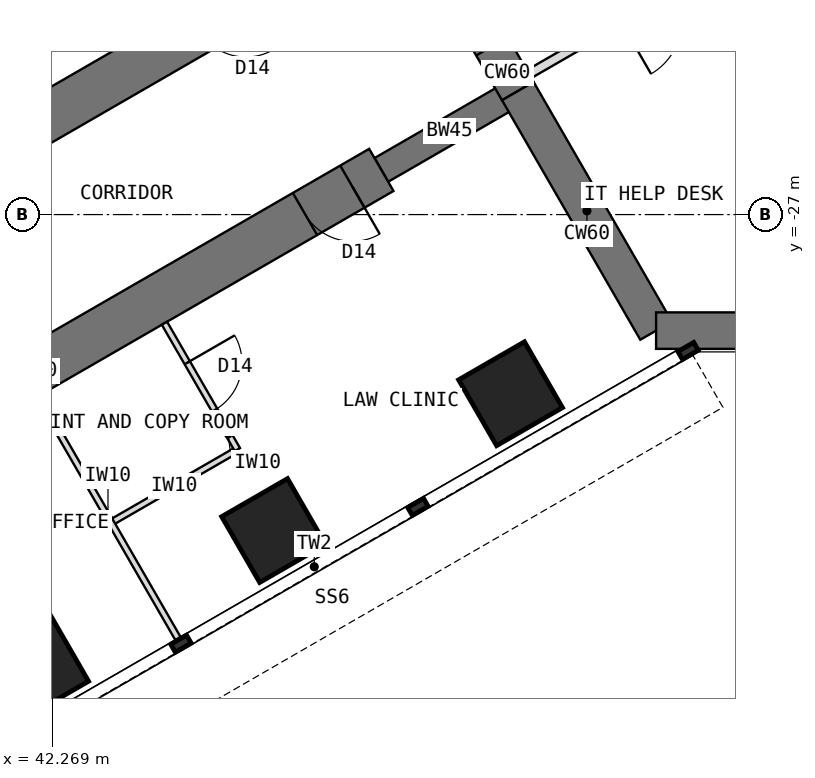
"""IFC4 building model, lengths in metres.
Left out: names, types, materials, properties, quantities, classifications, styles, units other than length and angle.
Written with IfcOpenShell. Run it as: python <this file> out.ifc"""

import sys

from ifc_helpers import new_model, si_unit, direction, frame, frame_2d, origin, origin_2d, place, context, subcontext, project, spatial, rectangle, extrude, element, fill, save


model = new_model("IFC4")
c1 = context("Model", 3, precision=1e-05, world=origin(), true_north=direction((0.0, 1.0)))
c2 = subcontext(c1, "Body", "Model", "MODEL_VIEW")
j1 = project(units=[si_unit("LENGTHUNIT", "METRE"), si_unit("PLANEANGLEUNIT", "RADIAN")], contexts=[c1])
p1 = place(None, origin())
s1 = spatial("IfcSite", under=j1, at=p1, CompositionType="ELEMENT")
p2 = place(p1, origin())
s2 = spatial("IfcBuilding", under=s1, at=p2, CompositionType="ELEMENT")
p3 = place(p2, frame((0.0, 0.0, 145.5)))
s3 = spatial("IfcBuildingStorey", under=s2, at=p3, CompositionType="ELEMENT", Elevation=145.5)
p4 = place(p3, frame((48.178, -21.939, 0.0), z_axis=(0.0, 0.0, 1.0), x_axis=(0.500010275428, -0.866019471182, 0.0)))
e1 = element("IfcWall", 1, at=p4, inside=s3, PredefinedType="SHEAR", context=c2, shape_type="SweptSolid", body=[
    extrude(rectangle(XDim=3.5, YDim=0.6, at=frame_2d((1.75, 0.0))), origin(), (0.0, 0.0, 1.0), 4.0),
])
p5 = place(p4, frame((0.85, 0.0, 0.0)))
e2 = element("IfcOpeningElement", 2, at=p5, cuts=e1, PredefinedType="OPENING", context=c2, shape_type="SweptSolid", body=[
    extrude(rectangle(XDim=1.8, YDim=2.1, at=frame_2d((0.9, 1.05))), frame((0.0, 0.31, 0.0), z_axis=(0.0, -1.0, 0.0), x_axis=(1.0, 0.0, 0.0)), (0.0, 0.0, 1.0), 0.62),
])
p6 = place(p3, frame((49.928, -24.97, 0.0), z_axis=(0.0, 0.0, 1.0), x_axis=(0.499984222037, -0.866034513004, 0.0)))
e3 = element("IfcWall", 3, at=p6, inside=s3, PredefinedType="SHEAR", context=c2, shape_type="SweptSolid", body=[
    extrude(rectangle(XDim=4.548, YDim=0.6, at=frame_2d((2.274, 0.0))), origin(), (0.0, 0.0, 1.0), 4.0),
])
p7 = place(p3, frame((52.202, -28.908, 0.0), z_axis=(0.0, 0.0, 1.0), x_axis=(1.0, 0.0, 0.0)))
e4 = element("IfcWall", 4, at=p7, inside=s3, PredefinedType="SHEAR", context=c2, shape_type="SweptSolid", body=[
    extrude(rectangle(XDim=12.596, YDim=0.6, at=frame_2d((6.298, 0.0))), origin(), (0.0, 0.0, 1.0), 4.0),
])
p8 = place(p3, frame((49.928, -24.97, 0.0), z_axis=(0.0, 0.0, 1.0), x_axis=(-0.866031863473, -0.499988811324, 0.0)))
e5 = element("IfcWall", 5, at=p8, inside=s3, PredefinedType="SHEAR", context=c2, shape_type="SweptSolid", body=[
    extrude(rectangle(XDim=2.592, YDim=0.45, at=frame_2d((1.296, 0.0))), origin(), (0.0, 0.0, 1.0), 4.0),
])
p9 = place(p3, frame((47.684, -26.266, 0.0), z_axis=(0.0, 0.0, 1.0), x_axis=(-0.866027579429, -0.499996231654, 0.0)))
e6 = element("IfcWall", 6, at=p9, inside=s3, PredefinedType="SHEAR", context=c2, shape_type="SweptSolid", body=[
    extrude(rectangle(XDim=13.2, YDim=0.8, at=frame_2d((6.6, 0.0))), origin(), (0.0, 0.0, 1.0), 4.0),
])
p10 = place(p9, frame((0.55, 0.0, 0.0)))
e7 = element("IfcOpeningElement", 7, at=p10, cuts=e6, PredefinedType="OPENING", context=c2, shape_type="SweptSolid", body=[
    extrude(rectangle(XDim=0.9, YDim=2.1, at=frame_2d((0.45, 1.05))), frame((0.0, 0.41, 0.0), z_axis=(0.0, -1.0, 0.0), x_axis=(1.0, 0.0, 0.0)), (0.0, 0.0, 1.0), 0.82),
])
p11 = place(p9, frame((7.3, 0.0, 0.0)))
e8 = element("IfcOpeningElement", 8, at=p11, cuts=e6, PredefinedType="OPENING", context=c2, shape_type="SweptSolid", body=[
    extrude(rectangle(XDim=0.9, YDim=2.1, at=frame_2d((0.45, 1.05))), frame((0.0, 0.41, 0.0), z_axis=(0.0, -1.0, 0.0), x_axis=(1.0, 0.0, 0.0)), (0.0, 0.0, 1.0), 0.82),
])
p12 = place(p3, frame((45.934, -23.234, 0.0), z_axis=(0.0, 0.0, 1.0), x_axis=(-0.866019570528, -0.500010103361, 0.0)))
e9 = element("IfcWall", 9, at=p12, inside=s3, PredefinedType="SHEAR", context=c2, shape_type="SweptSolid", body=[
    extrude(rectangle(XDim=13.2, YDim=0.8, at=frame_2d((6.6, 0.0))), origin(), (0.0, 0.0, 1.0), 4.0),
])
p13 = place(p12, frame((0.55, 0.0, 0.0)))
e10 = element("IfcOpeningElement", 10, at=p13, cuts=e9, PredefinedType="OPENING", context=c2, shape_type="SweptSolid", body=[
    extrude(rectangle(XDim=0.9, YDim=2.1, at=frame_2d((0.45, 1.05))), frame((0.0, 0.41, 0.0), z_axis=(0.0, -1.0, 0.0), x_axis=(1.0, 0.0, 0.0)), (0.0, 0.0, 1.0), 0.82),
])
p14 = place(p12, frame((7.3, 0.0, 0.0)))
e11 = element("IfcOpeningElement", 11, at=p14, cuts=e9, PredefinedType="OPENING", context=c2, shape_type="SweptSolid", body=[
    extrude(rectangle(XDim=0.9, YDim=2.1, at=frame_2d((0.45, 1.05))), frame((0.0, 0.41, 0.0), z_axis=(0.0, -1.0, 0.0), x_axis=(1.0, 0.0, 0.0)), (0.0, 0.0, 1.0), 0.82),
])
for number, where, z_axis, x_axis in (
    (12, (49.809, -29.946, 0.0), (0.0, 0.0, 1.0), (0.866, 0.5, 0.0)),
    (13, (45.912, -32.196, 0.0), (0.0, 0.0, 1.0), (0.866, 0.5, 0.0)),
    (14, (42.014, -34.446, 0.0), (0.0, 0.0, 1.0), (0.866, 0.5, 0.0)),
):
    element("IfcColumn", number, at=place(p3, frame(where, z_axis=z_axis, x_axis=x_axis)), inside=s3, PredefinedType="COLUMN", context=c2, shape_type="SweptSolid", body=[
        extrude(rectangle(XDim=1.25, YDim=1.25, at=origin_2d()), origin(), (0.0, 0.0, 1.0), 4.0),
    ])
p15 = place(p3, frame((42.038, -29.987, 0.0), z_axis=(0.0, 0.0, 1.0), x_axis=(0.499975146636, -0.866039752405, 0.0)))
e15 = element("IfcWall", 15, at=p15, inside=s3, PredefinedType="PARTITIONING", context=c2, shape_type="SweptSolid", body=[
    extrude(rectangle(XDim=4.6, YDim=0.1, at=frame_2d((2.3, 0.0))), origin(), (0.0, 0.0, 1.0), 3.8),
])
p16 = place(p3, frame((45.316, -30.865, 0.0), z_axis=(0.0, 0.0, 1.0), x_axis=(-0.866024647952, -0.500001309137, 0.0)))
e16 = element("IfcWall", 16, at=p16, inside=s3, PredefinedType="PARTITIONING", context=c2, shape_type="SweptSolid", body=[
    extrude(rectangle(XDim=2.4, YDim=0.1, at=frame_2d((1.2, 0.0))), origin(), (0.0, 0.0, 1.0), 3.8),
])
p17 = place(p3, frame((44.116, -28.787, 0.0), z_axis=(0.0, 0.0, 1.0), x_axis=(0.499957262057, -0.866050077142, 0.0)))
e17 = element("IfcWall", 17, at=p17, inside=s3, PredefinedType="PARTITIONING", context=c2, shape_type="SweptSolid", body=[
    extrude(rectangle(XDim=2.4, YDim=0.1, at=frame_2d((1.2, 0.0))), origin(), (0.0, 0.0, 1.0), 3.8),
])
p18 = place(p17, frame((0.75, 0.0, 0.0)))
e18 = element("IfcOpeningElement", 18, at=p18, cuts=e17, PredefinedType="OPENING", context=c2, shape_type="SweptSolid", body=[
    extrude(rectangle(XDim=0.9, YDim=2.1, at=frame_2d((0.45, 1.05))), frame((0.0, 0.06, 0.0), z_axis=(0.0, -1.0, 0.0), x_axis=(1.0, 0.0, 0.0)), (0.0, 0.0, 1.0), 0.12),
])
p19 = place(p3, frame((54.017, -22.436, 0.0), z_axis=(0.0, 0.0, 1.0), x_axis=(-0.86602002524, -0.500009315796, 0.0)))
e19 = element("IfcWall", 19, at=p19, inside=s3, PredefinedType="PARTITIONING", context=c2, shape_type="SweptSolid", body=[
    extrude(rectangle(XDim=4.519, YDim=0.15, at=frame_2d((2.259, 0.0))), origin(), (0.0, 0.0, 1.0), 3.8),
])
p20 = place(p19, frame((1.769, 0.0, 0.0)))
e20 = element("IfcOpeningElement", 20, at=p20, cuts=e19, PredefinedType="OPENING", context=c2, shape_type="SweptSolid", body=[
    extrude(rectangle(XDim=1.0, YDim=2.1, at=frame_2d((0.5, 1.05))), frame((0.0, 0.085, 0.0), z_axis=(0.0, -1.0, 0.0), x_axis=(1.0, 0.0, 0.0)), (0.0, 0.0, 1.0), 0.17),
])
p21 = place(p5, origin())
e21 = element("IfcDoor", 21, at=p21, inside=s3, OperationType="DOUBLE_DOOR_DOUBLE_SWING", PredefinedType="DOOR", context=c2, shape_type="SweptSolid", body=[
    extrude(rectangle(XDim=1.72, YDim=2.06, at=frame_2d((0.9, 1.03))), frame((0.0, 0.025, 0.0), z_axis=(0.0, -1.0, 0.0), x_axis=(1.0, 0.0, 0.0)), (0.0, 0.0, 1.0), 0.05),
    extrude(rectangle(XDim=0.04, YDim=2.1, at=frame_2d((0.02, 1.05))), frame((0.0, 0.3, 0.0), z_axis=(0.0, -1.0, 0.0), x_axis=(1.0, 0.0, 0.0)), (0.0, 0.0, 1.0), 0.6),
    extrude(rectangle(XDim=0.04, YDim=2.1, at=frame_2d((1.78, 1.05))), frame((0.0, 0.3, 0.0), z_axis=(0.0, -1.0, 0.0), x_axis=(1.0, 0.0, 0.0)), (0.0, 0.0, 1.0), 0.6),
    extrude(rectangle(XDim=1.72, YDim=0.04, at=frame_2d((0.9, 2.08))), frame((0.0, 0.3, 0.0), z_axis=(0.0, -1.0, 0.0), x_axis=(1.0, 0.0, 0.0)), (0.0, 0.0, 1.0), 0.6),
])
fill(e2, e21)
p22 = place(p18, origin())
e22 = element("IfcDoor", 22, at=p22, inside=s3, OperationType="SINGLE_SWING_LEFT", PredefinedType="DOOR", context=c2, shape_type="SweptSolid", body=[
    extrude(rectangle(XDim=0.9, YDim=2.1, at=frame_2d((0.45, 1.05))), frame((0.0, 0.025, 0.0), z_axis=(0.0, -1.0, 0.0), x_axis=(1.0, 0.0, 0.0)), (0.0, 0.0, 1.0), 0.05),
])
fill(e18, e22)
p23 = place(p10, origin())
e23 = element("IfcDoor", 23, at=p23, inside=s3, OperationType="SINGLE_SWING_LEFT", PredefinedType="DOOR", context=c2, shape_type="SweptSolid", body=[
    extrude(rectangle(XDim=0.82, YDim=2.06, at=frame_2d((0.45, 1.03))), frame((0.0, 0.025, 0.0), z_axis=(0.0, -1.0, 0.0), x_axis=(1.0, 0.0, 0.0)), (0.0, 0.0, 1.0), 0.05),
    extrude(rectangle(XDim=0.04, YDim=2.1, at=frame_2d((0.02, 1.05))), frame((0.0, 0.4, 0.0), z_axis=(0.0, -1.0, 0.0), x_axis=(1.0, 0.0, 0.0)), (0.0, 0.0, 1.0), 0.8),
    extrude(rectangle(XDim=0.04, YDim=2.1, at=frame_2d((0.88, 1.05))), frame((0.0, 0.4, 0.0), z_axis=(0.0, -1.0, 0.0), x_axis=(1.0, 0.0, 0.0)), (0.0, 0.0, 1.0), 0.8),
    extrude(rectangle(XDim=0.82, YDim=0.04, at=frame_2d((0.45, 2.08))), frame((0.0, 0.4, 0.0), z_axis=(0.0, -1.0, 0.0), x_axis=(1.0, 0.0, 0.0)), (0.0, 0.0, 1.0), 0.8),
])
fill(e7, e23)
save(model, sys.argv[1])
